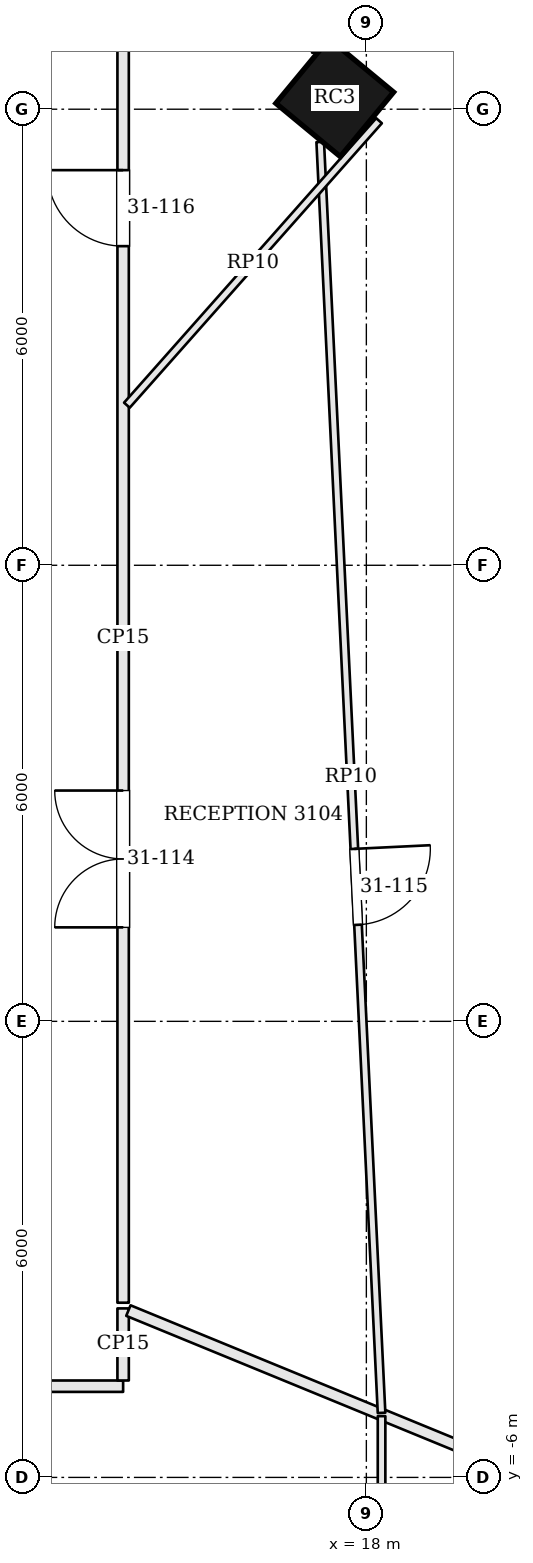
"""IFC4 building model, lengths in metres.
Left out: names, types, materials, properties, quantities, classifications, styles, units other than length and angle.
Written with IfcOpenShell. Run it as: python <this file> out.ifc"""

import sys

from ifc_helpers import new_model, si_unit, direction, frame, frame_2d, origin, origin_2d, place, context, subcontext, project, spatial, rectangle, extrude, element, fill, save


model = new_model("IFC4")
c1 = context("Model", 3, precision=1e-05, world=origin(), true_north=direction((0.0, 1.0)))
c2 = subcontext(c1, "Body", "Model", "MODEL_VIEW")
j1 = project(units=[si_unit("LENGTHUNIT", "METRE"), si_unit("PLANEANGLEUNIT", "RADIAN")], contexts=[c1])
p1 = place(None, origin())
s1 = spatial("IfcSite", under=j1, at=p1, CompositionType="ELEMENT")
p2 = place(p1, origin())
s2 = spatial("IfcBuilding", under=s1, at=p2, CompositionType="ELEMENT")
p3 = place(p2, frame((0.0, 0.0, 130.5)))
s3 = spatial("IfcBuildingStorey", under=s2, at=p3, CompositionType="ELEMENT", Elevation=130.5)
p4 = place(p3, frame((17.584, 12.151, 0.0), z_axis=(0.0, 0.0, 1.0), x_axis=(-0.770679191336, 0.637223339216, 0.0)))
e1 = element("IfcColumn", 1, at=p4, inside=s3, PredefinedType="COLUMN", context=c2, shape_type="SweptSolid", body=[
    extrude(rectangle(XDim=1.1, YDim=1.1, at=origin_2d()), origin(), (0.0, 0.0, 1.0), 3.9),
])
p5 = place(p3, frame((-4.465, -4.8, 0.0), z_axis=(0.0, 0.0, 1.0), x_axis=(1.0, 0.0, 0.0)))
e2 = element("IfcWall", 2, at=p5, inside=s3, PredefinedType="PARTITIONING", context=c2, shape_type="SweptSolid", body=[
    extrude(rectangle(XDim=19.265, YDim=0.15, at=frame_2d((9.633, 0.0))), origin(), (0.0, 0.0, 1.0), 3.198),
])
p6 = place(p5, frame((3.654, 0.0, 0.0)))
e3 = element("IfcOpeningElement", 3, at=p6, cuts=e2, PredefinedType="OPENING", context=c2, shape_type="SweptSolid", body=[
    extrude(rectangle(XDim=1.8, YDim=2.1, at=frame_2d((0.9, 1.05))), frame((0.0, 0.085, 0.0), z_axis=(0.0, -1.0, 0.0), x_axis=(1.0, 0.0, 0.0)), (0.0, 0.0, 1.0), 0.17),
])
p7 = place(p5, frame((11.229, 0.0, 0.0)))
e4 = element("IfcOpeningElement", 4, at=p7, cuts=e2, PredefinedType="OPENING", context=c2, shape_type="SweptSolid", body=[
    extrude(rectangle(XDim=1.0, YDim=2.4, at=frame_2d((0.5, 1.2))), frame((0.0, 0.085, 0.0), z_axis=(0.0, -1.0, 0.0), x_axis=(1.0, 0.0, 0.0)), (0.0, 0.0, 1.0), 0.17),
])
p8 = place(p3, frame((14.8, -4.725, 0.0), z_axis=(0.0, 0.0, 1.0), x_axis=(0.0, 1.0, 0.0)))
e5 = element("IfcWall", 5, at=p8, inside=s3, PredefinedType="PARTITIONING", context=c2, shape_type="SweptSolid", body=[
    extrude(rectangle(XDim=0.948, YDim=0.15, at=frame_2d((0.474, 0.0))), origin(), (0.0, 0.0, 1.0), 3.198),
])
p9 = place(p3, frame((25.931, -8.346, 0.0), z_axis=(0.0, 0.0, 1.0), x_axis=(-0.92507887737, 0.379775026355, 0.0)))
e6 = element("IfcWall", 6, at=p9, inside=s3, PredefinedType="PARTITIONING", context=c2, shape_type="SweptSolid", body=[
    extrude(rectangle(XDim=11.957, YDim=0.15, at=frame_2d((5.979, 0.0))), origin(), (0.0, 0.0, 1.0), 3.198),
])
p10 = place(p3, frame((14.8, -3.702, 0.0), z_axis=(0.0, 0.0, 1.0), x_axis=(0.0, 1.0, 0.0)))
e7 = element("IfcWall", 7, at=p10, inside=s3, PredefinedType="PARTITIONING", context=c2, shape_type="SweptSolid", body=[
    extrude(rectangle(XDim=17.502, YDim=0.15, at=frame_2d((8.751, 0.0))), origin(), (0.0, 0.0, 1.0), 3.198),
])
p11 = place(p10, frame((4.938, 0.0, 0.0)))
e8 = element("IfcOpeningElement", 8, at=p11, cuts=e7, PredefinedType="OPENING", context=c2, shape_type="SweptSolid", body=[
    extrude(rectangle(XDim=1.8, YDim=2.1, at=frame_2d((0.9, 1.05))), frame((0.0, 0.085, 0.0), z_axis=(0.0, -1.0, 0.0), x_axis=(1.0, 0.0, 0.0)), (0.0, 0.0, 1.0), 0.17),
])
p12 = place(p10, frame((13.9, 0.0, 0.0)))
e9 = element("IfcOpeningElement", 9, at=p12, cuts=e7, PredefinedType="OPENING", context=c2, shape_type="SweptSolid", body=[
    extrude(rectangle(XDim=1.0, YDim=2.4, at=frame_2d((0.5, 1.2))), frame((0.0, 0.085, 0.0), z_axis=(0.0, -1.0, 0.0), x_axis=(1.0, 0.0, 0.0)), (0.0, 0.0, 1.0), 0.17),
])
p13 = place(p3, frame((18.2, -5.194, 0.0), z_axis=(0.0, 0.0, 1.0), x_axis=(0.0, -1.0, 0.0)))
e10 = element("IfcWall", 10, at=p13, inside=s3, PredefinedType="PARTITIONING", context=c2, shape_type="SweptSolid", body=[
    extrude(rectangle(XDim=3.006, YDim=0.1, at=frame_2d((1.503, 0.0))), origin(), (0.0, 0.0, 1.0), 3.184),
])
p14 = place(p13, frame((1.75, 0.0, 0.0)))
e11 = element("IfcOpeningElement", 11, at=p14, cuts=e10, PredefinedType="OPENING", context=c2, shape_type="SweptSolid", body=[
    extrude(rectangle(XDim=0.9, YDim=2.1, at=frame_2d((0.45, 1.05))), frame((0.0, 0.06, 0.0), z_axis=(0.0, -1.0, 0.0), x_axis=(1.0, 0.0, 0.0)), (0.0, 0.0, 1.0), 0.12),
])
p15 = place(p3, frame((17.211, 15.349, 0.0), z_axis=(0.0, 0.0, 1.0), x_axis=(0.048152668687, -0.998839987435, 0.0)))
e12 = element("IfcWall", 12, at=p15, inside=s3, PredefinedType="PARTITIONING", context=c2, shape_type="SweptSolid", body=[
    extrude(rectangle(XDim=2.606, YDim=0.1, at=frame_2d((1.303, 0.0))), origin(), (0.0, 0.0, 1.0), 3.184),
])
p16 = place(p3, frame((17.393, 11.569, 0.0), z_axis=(0.0, 0.0, 1.0), x_axis=(0.048202645711, -0.998837576859, 0.0)))
e13 = element("IfcWall", 13, at=p16, inside=s3, PredefinedType="PARTITIONING", context=c2, shape_type="SweptSolid", body=[
    extrude(rectangle(XDim=16.74, YDim=0.1, at=frame_2d((8.37, 0.0))), origin(), (0.0, 0.0, 1.0), 3.184),
])
p17 = place(p16, frame((9.311, 0.0, 0.0)))
e14 = element("IfcOpeningElement", 14, at=p17, cuts=e13, PredefinedType="OPENING", context=c2, shape_type="SweptSolid", body=[
    extrude(rectangle(XDim=1.0, YDim=2.1, at=frame_2d((0.5, 1.05))), frame((0.0, 0.06, 0.0), z_axis=(0.0, -1.0, 0.0), x_axis=(1.0, 0.0, 0.0)), (0.0, 0.0, 1.0), 0.12),
])
p18 = place(p3, frame((14.85, 8.106, 0.0), z_axis=(0.0, 0.0, 1.0), x_axis=(0.663305650233, 0.748348591479, 0.0)))
e15 = element("IfcWall", 15, at=p18, inside=s3, PredefinedType="PARTITIONING", context=c2, shape_type="SweptSolid", body=[
    extrude(rectangle(XDim=5.001, YDim=0.1, at=frame_2d((2.5, 0.0))), origin(), (0.0, 0.0, 1.0), 3.184),
])
p19 = place(p11, origin())
e16 = element("IfcDoor", 16, at=p19, inside=s3, OperationType="DOUBLE_DOOR_SINGLE_SWING", PredefinedType="DOOR", context=c2, shape_type="SweptSolid", body=[
    extrude(rectangle(XDim=1.8, YDim=2.1, at=frame_2d((0.9, 1.05))), frame((0.0, 0.025, 0.0), z_axis=(0.0, -1.0, 0.0), x_axis=(1.0, 0.0, 0.0)), (0.0, 0.0, 1.0), 0.05),
])
fill(e8, e16)
p20 = place(p17, origin())
e17 = element("IfcDoor", 17, at=p20, inside=s3, OperationType="SINGLE_SWING_LEFT", PredefinedType="DOOR", context=c2, shape_type="SweptSolid", body=[
    extrude(rectangle(XDim=1.0, YDim=2.1, at=frame_2d((0.5, 1.05))), frame((0.0, 0.025, 0.0), z_axis=(0.0, -1.0, 0.0), x_axis=(1.0, 0.0, 0.0)), (0.0, 0.0, 1.0), 0.05),
])
fill(e14, e17)
p21 = place(p12, origin())
e18 = element("IfcDoor", 18, at=p21, inside=s3, OperationType="SINGLE_SWING_RIGHT", PredefinedType="DOOR", context=c2, shape_type="SweptSolid", body=[
    extrude(rectangle(XDim=1.0, YDim=2.4, at=frame_2d((0.5, 1.2))), frame((0.0, 0.025, 0.0), z_axis=(0.0, -1.0, 0.0), x_axis=(1.0, 0.0, 0.0)), (0.0, 0.0, 1.0), 0.05),
])
fill(e9, e18)
save(model, sys.argv[1])
